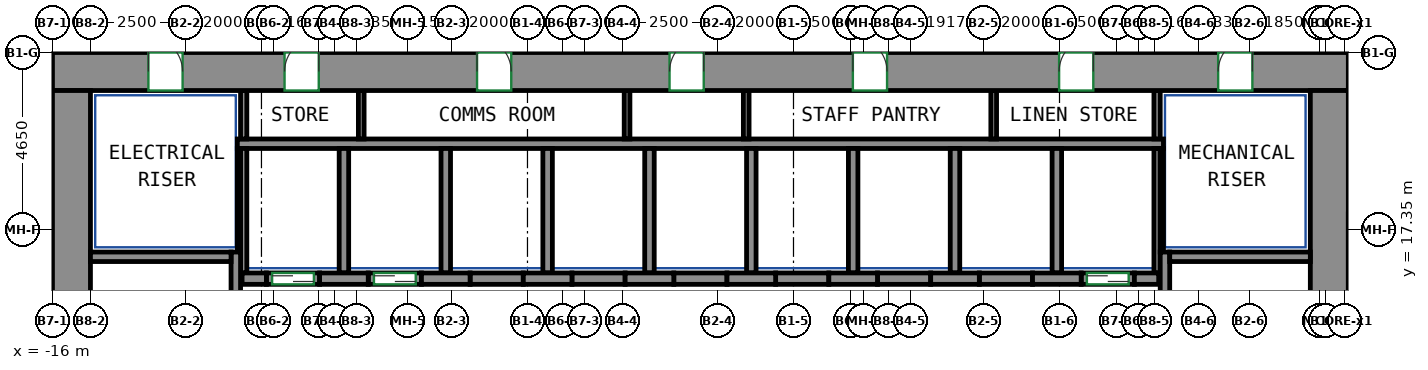
"""IFC4 building model, lengths in metres.
Left out: names, types, materials, properties, quantities, classifications, styles, units other than length and angle.
Written with IfcOpenShell. Run it as: python <this file> out.ifc"""

import sys

from ifc_helpers import new_model, si_unit, direction, frame, frame_2d, origin, place, context, subcontext, project, spatial, rectangle, extrude, source, transform, mapped, element, fill, save


model = new_model("IFC4")
c1 = context("Model", 3, precision=1e-05, world=origin(), true_north=direction((0.0, 1.0)))
c2 = subcontext(c1, "Body", "Model", "MODEL_VIEW")
j1 = project(units=[si_unit("LENGTHUNIT", "METRE"), si_unit("PLANEANGLEUNIT", "RADIAN")], contexts=[c1])
p1 = place(None, origin())
s1 = spatial("IfcSite", under=j1, at=p1, CompositionType="ELEMENT")
p2 = place(p1, origin())
s2 = spatial("IfcBuilding", under=s1, at=p2, CompositionType="ELEMENT")
p3 = place(p2, frame((0.0, 0.0, 51.0)))
s3 = spatial("IfcBuildingStorey", under=s2, at=p3, CompositionType="ELEMENT", Elevation=51.0)
m1 = source(origin(), c2, "Body", "SweptSolid", [
    extrude(rectangle(XDim=34.1, YDim=1.0, at=frame_2d((17.05, 0.0))), origin(), (0.0, 0.0, 1.0), 3.72),
])
p4 = place(p3, frame((-16.0, 21.5, 0.0), z_axis=(0.0, 0.0, 1.0), x_axis=(1.0, 0.0, 0.0)))
e1 = element("IfcWall", 1, at=p4, inside=s3, PredefinedType="SHEAR", context=c2, shape_type="MappedRepresentation", body=[
    mapped(m1, transform((0.0, 0.0, 0.0))),
])
p5 = place(p4, frame((6.108, 0.0, 0.0)))
e2 = element("IfcOpeningElement", 2, at=p5, cuts=e1, PredefinedType="OPENING", context=c2, shape_type="SweptSolid", body=[
    extrude(rectangle(XDim=0.9, YDim=2.1, at=frame_2d((0.45, 1.05))), frame((0.0, 0.51, 0.0), z_axis=(0.0, -1.0, 0.0), x_axis=(1.0, 0.0, 0.0)), (0.0, 0.0, 1.0), 1.02),
])
p6 = place(p4, frame((11.173, 0.0, 0.0)))
e3 = element("IfcOpeningElement", 3, at=p6, cuts=e1, PredefinedType="OPENING", context=c2, shape_type="SweptSolid", body=[
    extrude(rectangle(XDim=0.9, YDim=2.1, at=frame_2d((0.45, 1.05))), frame((0.0, 0.51, 0.0), z_axis=(0.0, -1.0, 0.0), x_axis=(1.0, 0.0, 0.0)), (0.0, 0.0, 1.0), 1.02),
])
p7 = place(p4, frame((16.238, 0.0, 0.0)))
e4 = element("IfcOpeningElement", 4, at=p7, cuts=e1, PredefinedType="OPENING", context=c2, shape_type="SweptSolid", body=[
    extrude(rectangle(XDim=0.9, YDim=2.1, at=frame_2d((0.45, 1.05))), frame((0.0, 0.51, 0.0), z_axis=(0.0, -1.0, 0.0), x_axis=(1.0, 0.0, 0.0)), (0.0, 0.0, 1.0), 1.02),
])
p8 = place(p4, frame((21.062, 0.0, 0.0)))
e5 = element("IfcOpeningElement", 5, at=p8, cuts=e1, PredefinedType="OPENING", context=c2, shape_type="SweptSolid", body=[
    extrude(rectangle(XDim=0.9, YDim=2.1, at=frame_2d((0.45, 1.05))), frame((0.0, 0.51, 0.0), z_axis=(0.0, -1.0, 0.0), x_axis=(1.0, 0.0, 0.0)), (0.0, 0.0, 1.0), 1.02),
])
p9 = place(p4, frame((26.489, 0.0, 0.0)))
e6 = element("IfcOpeningElement", 6, at=p9, cuts=e1, PredefinedType="OPENING", context=c2, shape_type="SweptSolid", body=[
    extrude(rectangle(XDim=0.9, YDim=2.1, at=frame_2d((0.45, 1.05))), frame((0.0, 0.51, 0.0), z_axis=(0.0, -1.0, 0.0), x_axis=(1.0, 0.0, 0.0)), (0.0, 0.0, 1.0), 1.02),
])
p10 = place(p4, frame((2.525, 0.0, 0.0)))
e7 = element("IfcOpeningElement", 7, at=p10, cuts=e1, PredefinedType="OPENING", context=c2, shape_type="SweptSolid", body=[
    extrude(rectangle(XDim=0.9, YDim=2.1, at=frame_2d((0.45, 1.05))), frame((0.0, 0.51, 0.0), z_axis=(0.0, -1.0, 0.0), x_axis=(1.0, 0.0, 0.0)), (0.0, 0.0, 1.0), 1.02),
])
p11 = place(p4, frame((30.675, 0.0, 0.0)))
e8 = element("IfcOpeningElement", 8, at=p11, cuts=e1, PredefinedType="OPENING", context=c2, shape_type="SweptSolid", body=[
    extrude(rectangle(XDim=0.9, YDim=2.1, at=frame_2d((0.45, 1.05))), frame((0.0, 0.51, 0.0), z_axis=(0.0, -1.0, 0.0), x_axis=(1.0, 0.0, 0.0)), (0.0, 0.0, 1.0), 1.02),
])
m2 = source(origin(), c2, "Body", "SweptSolid", [
    extrude(rectangle(XDim=12.0, YDim=1.0, at=frame_2d((6.0, 0.0))), origin(), (0.0, 0.0, 1.0), 3.72),
])
for number, where, z_axis, x_axis in (
    (9, (-15.5, 9.0, 0.0), (0.0, 0.0, 1.0), (0.0, 1.0, 0.0)),
    (10, (17.6, 9.0, 0.0), (0.0, 0.0, 1.0), (0.0, 1.0, 0.0)),
):
    element("IfcWall", number, at=place(p3, frame(where, z_axis=z_axis, x_axis=x_axis)), inside=s3, PredefinedType="SHEAR", context=c2, shape_type="MappedRepresentation", body=[
        mapped(m2, transform((0.0, 0.0, 0.0))),
    ])
m3 = source(origin(), c2, "Body", "SweptSolid", [
    extrude(rectangle(XDim=7.75, YDim=0.25, at=frame_2d((3.875, 0.0))), origin(), (0.0, 0.0, 1.0), 3.72),
])
p12 = place(p3, frame((-11.175, 9.0, 0.0), z_axis=(0.0, 0.0, 1.0), x_axis=(0.0, 1.0, 0.0)))
e11 = element("IfcWall", 11, at=p12, inside=s3, PredefinedType="SHEAR", context=c2, shape_type="MappedRepresentation", body=[
    mapped(m3, transform((0.0, 0.0, 0.0))),
])
m4 = source(origin(), c2, "Body", "SweptSolid", [
    extrude(rectangle(XDim=3.7, YDim=0.25, at=frame_2d((1.85, 0.0))), origin(), (0.0, 0.0, 1.0), 3.72),
])
p13 = place(p3, frame((-15.0, 16.625, 0.0), z_axis=(0.0, 0.0, 1.0), x_axis=(1.0, 0.0, 0.0)))
e12 = element("IfcWall", 12, at=p13, inside=s3, PredefinedType="SHEAR", context=c2, shape_type="MappedRepresentation", body=[
    mapped(m4, transform((0.0, 0.0, 0.0))),
])
p14 = place(p3, frame((13.275, 9.0, 0.0), z_axis=(0.0, 0.0, 1.0), x_axis=(0.0, 1.0, 0.0)))
e13 = element("IfcWall", 13, at=p14, inside=s3, PredefinedType="SHEAR", context=c2, shape_type="MappedRepresentation", body=[
    mapped(m3, transform((0.0, 0.0, 0.0))),
])
m5 = source(origin(), c2, "Body", "SweptSolid", [
    extrude(rectangle(XDim=3.7, YDim=0.25, at=frame_2d((1.85, 0.0))), origin(), (0.0, 0.0, 1.0), 3.72),
])
p15 = place(p3, frame((13.4, 16.625, 0.0), z_axis=(0.0, 0.0, 1.0), x_axis=(1.0, 0.0, 0.0)))
e14 = element("IfcWall", 14, at=p15, inside=s3, PredefinedType="SHEAR", context=c2, shape_type="MappedRepresentation", body=[
    mapped(m5, transform((0.0, 0.0, 0.0))),
])
m6 = source(origin(), c2, "Body", "SweptSolid", [
    extrude(rectangle(XDim=0.64, YDim=0.3, at=frame_2d((0.32, 0.0))), origin(), (0.0, 0.0, 1.0), 3.72),
])
p16 = place(p3, frame((-11.01, 16.05, 0.0), z_axis=(0.0, 0.0, 1.0), x_axis=(1.0, 0.0, 0.0)))
e15 = element("IfcWall", 15, at=p16, inside=s3, PredefinedType="SHEAR", context=c2, shape_type="MappedRepresentation", body=[
    mapped(m6, transform((0.0, 0.0, 0.0))),
])
m7 = source(origin(), c2, "Body", "SweptSolid", [
    extrude(rectangle(XDim=1.28, YDim=0.3, at=frame_2d((0.64, 0.0))), origin(), (0.0, 0.0, 1.0), 3.72),
])
for number, where, z_axis, x_axis in (
    (16, (-8.97, 16.05, 0.0), (0.0, 0.0, 1.0), (1.0, 0.0, 0.0)),
    (17, (-6.29, 16.05, 0.0), (0.0, 0.0, 1.0), (1.0, 0.0, 0.0)),
    (18, (-3.61, 16.05, 0.0), (0.0, 0.0, 1.0), (1.0, 0.0, 0.0)),
    (19, (-0.93, 16.05, 0.0), (0.0, 0.0, 1.0), (1.0, 0.0, 0.0)),
    (20, (1.75, 16.05, 0.0), (0.0, 0.0, 1.0), (1.0, 0.0, 0.0)),
    (21, (4.43, 16.05, 0.0), (0.0, 0.0, 1.0), (1.0, 0.0, 0.0)),
):
    element("IfcWall", number, at=place(p3, frame(where, z_axis=z_axis, x_axis=x_axis)), inside=s3, PredefinedType="SHEAR", context=c2, shape_type="MappedRepresentation", body=[
        mapped(m7, transform((0.0, 0.0, 0.0))),
    ])
m8 = source(origin(), c2, "Body", "SweptSolid", [
    extrude(rectangle(XDim=1.28, YDim=0.3, at=frame_2d((0.64, 0.0))), origin(), (0.0, 0.0, 1.0), 3.72),
])
p17 = place(p3, frame((7.11, 16.05, 0.0), z_axis=(0.0, 0.0, 1.0), x_axis=(1.0, 0.0, 0.0)))
e22 = element("IfcWall", 22, at=p17, inside=s3, PredefinedType="SHEAR", context=c2, shape_type="MappedRepresentation", body=[
    mapped(m8, transform((0.0, 0.0, 0.0))),
])
p18 = place(p3, frame((9.79, 16.05, 0.0), z_axis=(0.0, 0.0, 1.0), x_axis=(1.0, 0.0, 0.0)))
e23 = element("IfcWall", 23, at=p18, inside=s3, PredefinedType="SHEAR", context=c2, shape_type="MappedRepresentation", body=[
    mapped(m7, transform((0.0, 0.0, 0.0))),
])
m9 = source(origin(), c2, "Body", "SweptSolid", [
    extrude(rectangle(XDim=0.64, YDim=0.3, at=frame_2d((0.32, 0.0))), origin(), (0.0, 0.0, 1.0), 3.72),
])
p19 = place(p3, frame((12.47, 16.05, 0.0), z_axis=(0.0, 0.0, 1.0), x_axis=(1.0, 0.0, 0.0)))
e24 = element("IfcWall", 24, at=p19, inside=s3, PredefinedType="SHEAR", context=c2, shape_type="MappedRepresentation", body=[
    mapped(m9, transform((0.0, 0.0, 0.0))),
])
m10 = source(origin(), c2, "Body", "SweptSolid", [
    extrude(rectangle(XDim=1.4, YDim=0.3, at=frame_2d((0.7, 0.0))), origin(), (0.0, 0.0, 1.0), 3.72),
])
p20 = place(p3, frame((11.07, 16.05, 0.0), z_axis=(0.0, 0.0, 1.0), x_axis=(1.0, 0.0, 0.0)))
e25 = element("IfcWall", 25, at=p20, inside=s3, PredefinedType="PARTITIONING", context=c2, shape_type="MappedRepresentation", body=[
    mapped(m10, transform((0.0, 0.0, 0.0))),
])
p21 = place(p20, frame((0.15, 0.0, 0.0)))
e26 = element("IfcOpeningElement", 26, at=p21, cuts=e25, PredefinedType="OPENING", context=c2, shape_type="SweptSolid", body=[
    extrude(rectangle(XDim=1.1, YDim=2.1, at=frame_2d((0.55, 1.05))), frame((0.0, 0.16, 0.0), z_axis=(0.0, -1.0, 0.0), x_axis=(1.0, 0.0, 0.0)), (0.0, 0.0, 1.0), 0.32),
])
m11 = source(origin(), c2, "Body", "SweptSolid", [
    extrude(rectangle(XDim=1.4, YDim=0.3, at=frame_2d((0.7, 0.0))), origin(), (0.0, 0.0, 1.0), 3.72),
])
p22 = place(p3, frame((-10.37, 16.05, 0.0), z_axis=(0.0, 0.0, 1.0), x_axis=(1.0, 0.0, 0.0)))
e27 = element("IfcWall", 27, at=p22, inside=s3, PredefinedType="PARTITIONING", context=c2, shape_type="MappedRepresentation", body=[
    mapped(m11, transform((0.0, 0.0, 0.0))),
])
p23 = place(p22, frame((0.15, 0.0, 0.0)))
e28 = element("IfcOpeningElement", 28, at=p23, cuts=e27, PredefinedType="OPENING", context=c2, shape_type="SweptSolid", body=[
    extrude(rectangle(XDim=1.1, YDim=2.1, at=frame_2d((0.55, 1.05))), frame((0.0, 0.16, 0.0), z_axis=(0.0, -1.0, 0.0), x_axis=(1.0, 0.0, 0.0)), (0.0, 0.0, 1.0), 0.32),
])
p24 = place(p3, frame((-7.69, 16.05, 0.0), z_axis=(0.0, 0.0, 1.0), x_axis=(1.0, 0.0, 0.0)))
e29 = element("IfcWall", 29, at=p24, inside=s3, PredefinedType="PARTITIONING", context=c2, shape_type="MappedRepresentation", body=[
    mapped(m10, transform((0.0, 0.0, 0.0))),
])
p25 = place(p24, frame((0.15, 0.0, 0.0)))
e30 = element("IfcOpeningElement", 30, at=p25, cuts=e29, PredefinedType="OPENING", context=c2, shape_type="SweptSolid", body=[
    extrude(rectangle(XDim=1.1, YDim=2.1, at=frame_2d((0.55, 1.05))), frame((0.0, 0.16, 0.0), z_axis=(0.0, -1.0, 0.0), x_axis=(1.0, 0.0, 0.0)), (0.0, 0.0, 1.0), 0.32),
])
p26 = place(p3, frame((-5.01, 16.05, 0.0), z_axis=(0.0, 0.0, 1.0), x_axis=(1.0, 0.0, 0.0)))
e31 = element("IfcWall", 31, at=p26, inside=s3, PredefinedType="PARTITIONING", context=c2, shape_type="MappedRepresentation", body=[
    mapped(m10, transform((0.0, 0.0, 0.0))),
])
p27 = place(p3, frame((-2.33, 16.05, 0.0), z_axis=(0.0, 0.0, 1.0), x_axis=(1.0, 0.0, 0.0)))
e32 = element("IfcWall", 32, at=p27, inside=s3, PredefinedType="PARTITIONING", context=c2, shape_type="MappedRepresentation", body=[
    mapped(m11, transform((0.0, 0.0, 0.0))),
])
for number, where, z_axis, x_axis in (
    (33, (0.35, 16.05, 0.0), (0.0, 0.0, 1.0), (1.0, 0.0, 0.0)),
    (34, (3.03, 16.05, 0.0), (0.0, 0.0, 1.0), (1.0, 0.0, 0.0)),
):
    element("IfcWall", number, at=place(p3, frame(where, z_axis=z_axis, x_axis=x_axis)), inside=s3, PredefinedType="PARTITIONING", context=c2, shape_type="MappedRepresentation", body=[
        mapped(m10, transform((0.0, 0.0, 0.0))),
    ])
for number, where, z_axis, x_axis in (
    (35, (5.71, 16.05, 0.0), (0.0, 0.0, 1.0), (1.0, 0.0, 0.0)),
    (36, (8.39, 16.05, 0.0), (0.0, 0.0, 1.0), (1.0, 0.0, 0.0)),
):
    element("IfcWall", number, at=place(p3, frame(where, z_axis=z_axis, x_axis=x_axis)), inside=s3, PredefinedType="PARTITIONING", context=c2, shape_type="MappedRepresentation", body=[
        mapped(m11, transform((0.0, 0.0, 0.0))),
    ])
m12 = source(origin(), c2, "Body", "SweptSolid", [
    extrude(rectangle(XDim=24.37, YDim=0.25, at=frame_2d((12.185, 0.0))), origin(), (0.0, 0.0, 1.0), 3.72),
])
p28 = place(p3, frame((-11.135, 19.6, 0.0), z_axis=(0.0, 0.0, 1.0), x_axis=(1.0, 0.0, 0.0)))
e37 = element("IfcWall", 37, at=p28, inside=s3, PredefinedType="PARTITIONING", context=c2, shape_type="MappedRepresentation", body=[
    mapped(m12, transform((0.0, 0.0, 0.0))),
])
m13 = source(origin(), c2, "Body", "SweptSolid", [
    extrude(rectangle(XDim=3.275, YDim=0.165, at=frame_2d((1.638, 0.0))), origin(), (0.0, 0.0, 1.0), 3.72),
])
p29 = place(p3, frame((13.067, 16.2, 0.0), z_axis=(0.0, 0.0, 1.0), x_axis=(0.0, 1.0, 0.0)))
e38 = element("IfcWall", 38, at=p29, inside=s3, PredefinedType="PARTITIONING", context=c2, shape_type="MappedRepresentation", body=[
    mapped(m13, transform((0.0, 0.0, 0.0))),
])
m14 = source(origin(), c2, "Body", "SweptSolid", [
    extrude(rectangle(XDim=1.275, YDim=0.165, at=frame_2d((0.637, 0.0))), origin(), (0.0, 0.0, 1.0), 3.72),
])
p30 = place(p3, frame((13.067, 19.725, 0.0), z_axis=(0.0, 0.0, 1.0), x_axis=(0.0, 1.0, 0.0)))
e39 = element("IfcWall", 39, at=p30, inside=s3, PredefinedType="PARTITIONING", context=c2, shape_type="MappedRepresentation", body=[
    mapped(m14, transform((0.0, 0.0, 0.0))),
])
p31 = place(p3, frame((-10.968, 16.2, 0.0), z_axis=(0.0, 0.0, 1.0), x_axis=(0.0, 1.0, 0.0)))
e40 = element("IfcWall", 40, at=p31, inside=s3, PredefinedType="PARTITIONING", context=c2, shape_type="MappedRepresentation", body=[
    mapped(m13, transform((0.0, 0.0, 0.0))),
])
p32 = place(p3, frame((-10.968, 19.725, 0.0), z_axis=(0.0, 0.0, 1.0), x_axis=(0.0, 1.0, 0.0)))
e41 = element("IfcWall", 41, at=p32, inside=s3, PredefinedType="PARTITIONING", context=c2, shape_type="MappedRepresentation", body=[
    mapped(m14, transform((0.0, 0.0, 0.0))),
])
m15 = source(origin(), c2, "Body", "SweptSolid", [
    extrude(rectangle(XDim=3.275, YDim=0.25, at=frame_2d((1.638, 0.0))), origin(), (0.0, 0.0, 1.0), 3.72),
])
p33 = place(p3, frame((10.43, 16.2, 0.0), z_axis=(0.0, 0.0, 1.0), x_axis=(0.0, 1.0, 0.0)))
e42 = element("IfcWall", 42, at=p33, inside=s3, PredefinedType="PARTITIONING", context=c2, shape_type="MappedRepresentation", body=[
    mapped(m15, transform((0.0, 0.0, 0.0))),
])
m16 = source(origin(), c2, "Body", "SweptSolid", [
    extrude(rectangle(XDim=2.725, YDim=0.085, at=frame_2d((1.363, 0.0))), origin(), (0.0, 0.0, 1.0), 3.72),
])
p34 = place(p3, frame((13.192, 16.75, 0.0), z_axis=(0.0, 0.0, 1.0), x_axis=(0.0, 1.0, 0.0)))
e43 = element("IfcWall", 43, at=p34, inside=s3, PredefinedType="PARTITIONING", context=c2, shape_type="MappedRepresentation", body=[
    mapped(m16, transform((0.0, 0.0, 0.0))),
])
for number, where, z_axis, x_axis in (
    (44, (2.39, 16.2, 0.0), (0.0, 0.0, 1.0), (0.0, 1.0, 0.0)),
    (45, (5.07, 16.2, 0.0), (0.0, 0.0, 1.0), (0.0, 1.0, 0.0)),
    (46, (7.75, 16.2, 0.0), (0.0, 0.0, 1.0), (0.0, 1.0, 0.0)),
    (47, (-0.29, 16.2, 0.0), (0.0, 0.0, 1.0), (0.0, 1.0, 0.0)),
):
    element("IfcWall", number, at=place(p3, frame(where, z_axis=z_axis, x_axis=x_axis)), inside=s3, PredefinedType="PARTITIONING", context=c2, shape_type="MappedRepresentation", body=[
        mapped(m15, transform((0.0, 0.0, 0.0))),
    ])
p35 = place(p3, frame((-11.093, 16.75, 0.0), z_axis=(0.0, 0.0, 1.0), x_axis=(0.0, 1.0, 0.0)))
e48 = element("IfcWall", 48, at=p35, inside=s3, PredefinedType="PARTITIONING", context=c2, shape_type="MappedRepresentation", body=[
    mapped(m16, transform((0.0, 0.0, 0.0))),
])
for number, where, z_axis, x_axis in (
    (49, (-2.97, 16.2, 0.0), (0.0, 0.0, 1.0), (0.0, 1.0, 0.0)),
    (50, (-5.65, 16.2, 0.0), (0.0, 0.0, 1.0), (0.0, 1.0, 0.0)),
    (51, (-8.33, 16.2, 0.0), (0.0, 0.0, 1.0), (0.0, 1.0, 0.0)),
):
    element("IfcWall", number, at=place(p3, frame(where, z_axis=z_axis, x_axis=x_axis)), inside=s3, PredefinedType="PARTITIONING", context=c2, shape_type="MappedRepresentation", body=[
        mapped(m15, transform((0.0, 0.0, 0.0))),
    ])
m17 = source(origin(), c2, "Body", "SweptSolid", [
    extrude(rectangle(XDim=1.275, YDim=0.15, at=frame_2d((0.637, 0.0))), origin(), (0.0, 0.0, 1.0), 3.72),
])
for number, where, z_axis, x_axis in (
    (52, (-7.875, 19.725, 0.0), (0.0, 0.0, 1.0), (0.0, 1.0, 0.0)),
    (53, (-0.88, 19.725, 0.0), (0.0, 0.0, 1.0), (0.0, 1.0, 0.0)),
    (54, (2.256, 19.725, 0.0), (0.0, 0.0, 1.0), (0.0, 1.0, 0.0)),
    (55, (8.768, 19.725, 0.0), (0.0, 0.0, 1.0), (0.0, 1.0, 0.0)),
):
    element("IfcWall", number, at=place(p3, frame(where, z_axis=z_axis, x_axis=x_axis)), inside=s3, PredefinedType="PARTITIONING", context=c2, shape_type="MappedRepresentation", body=[
        mapped(m17, transform((0.0, 0.0, 0.0))),
    ])
p36 = place(p21, origin())
e56 = element("IfcDoor", 56, at=p36, inside=s3, OperationType="DOUBLE_DOOR_SLIDING", PredefinedType="DOOR", context=c2, shape_type="SweptSolid", body=[
    extrude(rectangle(XDim=1.1, YDim=2.1, at=frame_2d((0.55, 1.05))), frame((0.0, 0.025, 0.0), z_axis=(0.0, -1.0, 0.0), x_axis=(1.0, 0.0, 0.0)), (0.0, 0.0, 1.0), 0.05),
])
fill(e26, e56)
p37 = place(p23, origin())
e57 = element("IfcDoor", 57, at=p37, inside=s3, OperationType="DOUBLE_DOOR_SLIDING", PredefinedType="DOOR", context=c2, shape_type="SweptSolid", body=[
    extrude(rectangle(XDim=1.1, YDim=2.1, at=frame_2d((0.55, 1.05))), frame((0.0, 0.025, 0.0), z_axis=(0.0, -1.0, 0.0), x_axis=(1.0, 0.0, 0.0)), (0.0, 0.0, 1.0), 0.05),
])
fill(e28, e57)
p38 = place(p25, origin())
e58 = element("IfcDoor", 58, at=p38, inside=s3, OperationType="DOUBLE_DOOR_SLIDING", PredefinedType="DOOR", context=c2, shape_type="SweptSolid", body=[
    extrude(rectangle(XDim=1.1, YDim=2.1, at=frame_2d((0.55, 1.05))), frame((0.0, 0.025, 0.0), z_axis=(0.0, -1.0, 0.0), x_axis=(1.0, 0.0, 0.0)), (0.0, 0.0, 1.0), 0.05),
])
fill(e30, e58)
p39 = place(p5, origin())
e59 = element("IfcDoor", 59, at=p39, inside=s3, OperationType="SINGLE_SWING_RIGHT", PredefinedType="DOOR", context=c2, shape_type="SweptSolid", body=[
    extrude(rectangle(XDim=0.9, YDim=2.1, at=frame_2d((0.45, 1.05))), frame((0.0, -0.355, 0.0), z_axis=(0.0, -1.0, 0.0), x_axis=(1.0, 0.0, 0.0)), (0.0, 0.0, 1.0), 0.05),
])
fill(e2, e59)
p40 = place(p6, origin())
e60 = element("IfcDoor", 60, at=p40, inside=s3, OperationType="SINGLE_SWING_LEFT", PredefinedType="DOOR", context=c2, shape_type="SweptSolid", body=[
    extrude(rectangle(XDim=0.9, YDim=2.1, at=frame_2d((0.45, 1.05))), frame((0.0, -0.355, 0.0), z_axis=(0.0, -1.0, 0.0), x_axis=(1.0, 0.0, 0.0)), (0.0, 0.0, 1.0), 0.05),
])
fill(e3, e60)
p41 = place(p7, origin())
e61 = element("IfcDoor", 61, at=p41, inside=s3, OperationType="SINGLE_SWING_RIGHT", PredefinedType="DOOR", context=c2, shape_type="SweptSolid", body=[
    extrude(rectangle(XDim=0.9, YDim=2.1, at=frame_2d((0.45, 1.05))), frame((0.0, -0.355, 0.0), z_axis=(0.0, -1.0, 0.0), x_axis=(1.0, 0.0, 0.0)), (0.0, 0.0, 1.0), 0.05),
])
fill(e4, e61)
p42 = place(p8, origin())
e62 = element("IfcDoor", 62, at=p42, inside=s3, OperationType="SINGLE_SWING_LEFT", PredefinedType="DOOR", context=c2, shape_type="SweptSolid", body=[
    extrude(rectangle(XDim=0.9, YDim=2.1, at=frame_2d((0.45, 1.05))), frame((0.0, -0.355, 0.0), z_axis=(0.0, -1.0, 0.0), x_axis=(1.0, 0.0, 0.0)), (0.0, 0.0, 1.0), 0.05),
])
fill(e5, e62)
p43 = place(p9, origin())
e63 = element("IfcDoor", 63, at=p43, inside=s3, OperationType="SINGLE_SWING_RIGHT", PredefinedType="DOOR", context=c2, shape_type="SweptSolid", body=[
    extrude(rectangle(XDim=0.9, YDim=2.1, at=frame_2d((0.45, 1.05))), frame((0.0, -0.355, 0.0), z_axis=(0.0, -1.0, 0.0), x_axis=(1.0, 0.0, 0.0)), (0.0, 0.0, 1.0), 0.05),
])
fill(e6, e63)
p44 = place(p10, origin())
e64 = element("IfcDoor", 64, at=p44, inside=s3, OperationType="SINGLE_SWING_LEFT", PredefinedType="DOOR", context=c2, shape_type="SweptSolid", body=[
    extrude(rectangle(XDim=0.9, YDim=2.1, at=frame_2d((0.45, 1.05))), frame((0.0, -0.355, 0.0), z_axis=(0.0, -1.0, 0.0), x_axis=(1.0, 0.0, 0.0)), (0.0, 0.0, 1.0), 0.05),
])
fill(e7, e64)
p45 = place(p11, origin())
e65 = element("IfcDoor", 65, at=p45, inside=s3, OperationType="SINGLE_SWING_RIGHT", PredefinedType="DOOR", context=c2, shape_type="SweptSolid", body=[
    extrude(rectangle(XDim=0.9, YDim=2.1, at=frame_2d((0.45, 1.05))), frame((0.0, -0.355, 0.0), z_axis=(0.0, -1.0, 0.0), x_axis=(1.0, 0.0, 0.0)), (0.0, 0.0, 1.0), 0.05),
])
fill(e8, e65)
save(model, sys.argv[1])
